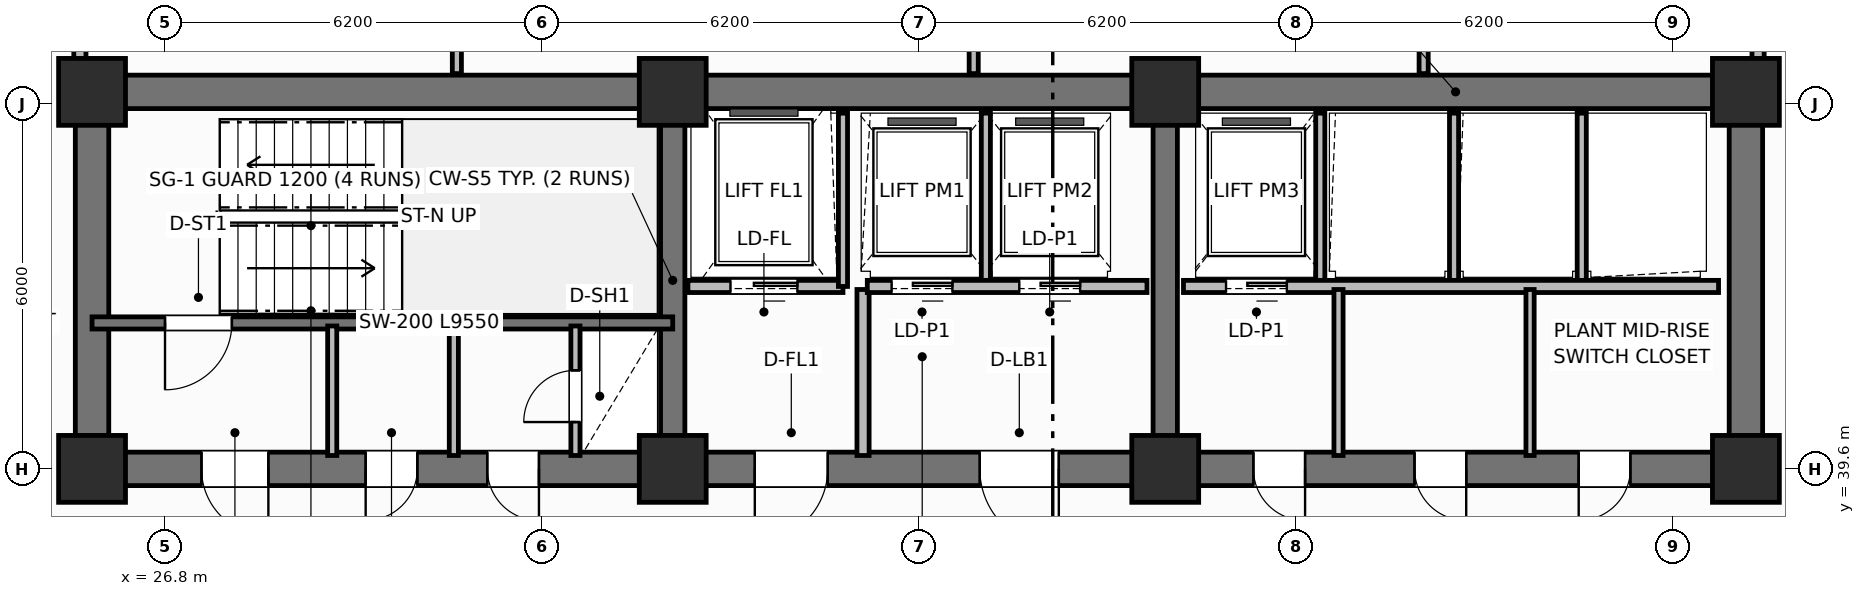
"""IFC4 building model, lengths in metres.
Left out: names, types, materials, properties, quantities, classifications, styles, units other than length and angle.
Written with IfcOpenShell. Run it as: python <this file> out.ifc"""

import sys

from ifc_helpers import new_model, si_unit, direction, frame, frame_2d, origin, origin_2d, place, context, subcontext, project, spatial, rectangle, extrude, element, fill, save


model = new_model("IFC4")
c1 = context("Model", 3, precision=1e-05, world=origin(), true_north=direction((0.0, 1.0)))
c2 = subcontext(c1, "Body", "Model", "MODEL_VIEW")
j1 = project(units=[si_unit("LENGTHUNIT", "METRE"), si_unit("PLANEANGLEUNIT", "RADIAN")], contexts=[c1])
p1 = place(None, origin())
s1 = spatial("IfcSite", under=j1, at=p1, CompositionType="ELEMENT")
p2 = place(p1, origin())
s2 = spatial("IfcBuilding", under=s1, at=p2, CompositionType="ELEMENT")
p3 = place(p2, frame((0.0, 0.0, 132.7)))
s3 = spatial("IfcBuildingStorey", under=s2, at=p3, CompositionType="ELEMENT", Elevation=132.7)
p4 = place(p3, frame((25.6, 45.8, 0.0), z_axis=(0.0, 0.0, 1.0), x_axis=(1.0, 0.0, 0.0)))
e1 = element("IfcWall", 1, at=p4, inside=s3, PredefinedType="SHEAR", context=c2, shape_type="SweptSolid", body=[
    extrude(rectangle(XDim=27.2, YDim=0.55, at=frame_2d((13.6, 0.0))), origin(), (0.0, 0.0, 1.0), 3.7),
])
for number, where, z_axis, x_axis in (
    (2, (25.6, 39.875, 0.0), (0.0, 0.0, 1.0), (0.0, 1.0, 0.0)),
    (3, (52.8, 39.875, 0.0), (0.0, 0.0, 1.0), (0.0, 1.0, 0.0)),
):
    element("IfcWall", number, at=place(p3, frame(where, z_axis=z_axis, x_axis=x_axis)), inside=s3, PredefinedType="SHEAR", context=c2, shape_type="SweptSolid", body=[
        extrude(rectangle(XDim=5.65, YDim=0.55, at=frame_2d((2.825, 0.0))), origin(), (0.0, 0.0, 1.0), 3.7),
    ])
p5 = place(p3, frame((52.8, 39.6, 0.0), z_axis=(0.0, 0.0, 1.0), x_axis=(-1.0, 0.0, 0.0)))
e4 = element("IfcWall", 4, at=p5, inside=s3, PredefinedType="SHEAR", context=c2, shape_type="SweptSolid", body=[
    extrude(rectangle(XDim=27.2, YDim=0.55, at=frame_2d((13.6, 0.0))), origin(), (0.0, 0.0, 1.0), 3.7),
])
p6 = place(p5, frame((24.3, 0.0, 0.0)))
e5 = element("IfcOpeningElement", 5, at=p6, cuts=e4, PredefinedType="OPENING", context=c2, shape_type="SweptSolid", body=[
    extrude(rectangle(XDim=1.1, YDim=2.15, at=frame_2d((0.55, 1.075))), frame((0.0, 0.285, 0.0), z_axis=(0.0, -1.0, 0.0), x_axis=(1.0, 0.0, 0.0)), (0.0, 0.0, 1.0), 0.57),
])
p7 = place(p5, frame((21.85, 0.0, 0.0)))
e6 = element("IfcOpeningElement", 6, at=p7, cuts=e4, PredefinedType="OPENING", context=c2, shape_type="SweptSolid", body=[
    extrude(rectangle(XDim=0.85, YDim=2.1, at=frame_2d((0.425, 1.05))), frame((0.0, 0.285, 0.0), z_axis=(0.0, -1.0, 0.0), x_axis=(1.0, 0.0, 0.0)), (0.0, 0.0, 1.0), 0.57),
])
p8 = place(p5, frame((19.85, 0.0, 0.0)))
e7 = element("IfcOpeningElement", 7, at=p8, cuts=e4, PredefinedType="OPENING", context=c2, shape_type="SweptSolid", body=[
    extrude(rectangle(XDim=0.85, YDim=2.1, at=frame_2d((0.425, 1.05))), frame((0.0, 0.285, 0.0), z_axis=(0.0, -1.0, 0.0), x_axis=(1.0, 0.0, 0.0)), (0.0, 0.0, 1.0), 0.57),
])
p9 = place(p5, frame((15.1, 0.0, 0.0)))
e8 = element("IfcOpeningElement", 8, at=p9, cuts=e4, PredefinedType="OPENING", context=c2, shape_type="SweptSolid", body=[
    extrude(rectangle(XDim=1.2, YDim=2.15, at=frame_2d((0.6, 1.075))), frame((0.0, 0.285, 0.0), z_axis=(0.0, -1.0, 0.0), x_axis=(1.0, 0.0, 0.0)), (0.0, 0.0, 1.0), 0.57),
])
p10 = place(p5, frame((11.3, 0.0, 0.0)))
e9 = element("IfcOpeningElement", 9, at=p10, cuts=e4, PredefinedType="OPENING", context=c2, shape_type="SweptSolid", body=[
    extrude(rectangle(XDim=1.3, YDim=2.2, at=frame_2d((0.65, 1.1))), frame((0.0, 0.285, 0.0), z_axis=(0.0, -1.0, 0.0), x_axis=(1.0, 0.0, 0.0)), (0.0, 0.0, 1.0), 0.57),
])
p11 = place(p5, frame((7.25, 0.0, 0.0)))
e10 = element("IfcOpeningElement", 10, at=p11, cuts=e4, PredefinedType="OPENING", context=c2, shape_type="SweptSolid", body=[
    extrude(rectangle(XDim=0.85, YDim=2.1, at=frame_2d((0.425, 1.05))), frame((0.0, 0.285, 0.0), z_axis=(0.0, -1.0, 0.0), x_axis=(1.0, 0.0, 0.0)), (0.0, 0.0, 1.0), 0.57),
])
p12 = place(p5, frame((4.6, 0.0, 0.0)))
e11 = element("IfcOpeningElement", 11, at=p12, cuts=e4, PredefinedType="OPENING", context=c2, shape_type="SweptSolid", body=[
    extrude(rectangle(XDim=0.85, YDim=2.1, at=frame_2d((0.425, 1.05))), frame((0.0, 0.285, 0.0), z_axis=(0.0, -1.0, 0.0), x_axis=(1.0, 0.0, 0.0)), (0.0, 0.0, 1.0), 0.57),
])
p13 = place(p5, frame((1.9, 0.0, 0.0)))
e12 = element("IfcOpeningElement", 12, at=p13, cuts=e4, PredefinedType="OPENING", context=c2, shape_type="SweptSolid", body=[
    extrude(rectangle(XDim=0.85, YDim=2.1, at=frame_2d((0.425, 1.05))), frame((0.0, 0.285, 0.0), z_axis=(0.0, -1.0, 0.0), x_axis=(1.0, 0.0, 0.0)), (0.0, 0.0, 1.0), 0.57),
])
for number, where, z_axis, x_axis in (
    (13, (35.15, 39.875, 0.0), (0.0, 0.0, 1.0), (0.0, 1.0, 0.0)),
    (14, (43.25, 39.875, 0.0), (0.0, 0.0, 1.0), (0.0, 1.0, 0.0)),
):
    element("IfcWall", number, at=place(p3, frame(where, z_axis=z_axis, x_axis=x_axis)), inside=s3, PredefinedType="SHEAR", context=c2, shape_type="SweptSolid", body=[
        extrude(rectangle(XDim=5.65, YDim=0.4, at=frame_2d((2.825, 0.0))), origin(), (0.0, 0.0, 1.0), 3.7),
    ])
for number, where, z_axis, x_axis in (
    (15, (25.6, 39.6, 0.0), (0.0, 0.0, 1.0), (1.0, 0.0, 0.0)),
    (16, (25.6, 45.8, 0.0), (0.0, 0.0, 1.0), (1.0, 0.0, 0.0)),
    (17, (35.15, 39.6, 0.0), (0.0, 0.0, 1.0), (1.0, 0.0, 0.0)),
    (18, (35.15, 45.8, 0.0), (0.0, 0.0, 1.0), (1.0, 0.0, 0.0)),
    (19, (43.25, 39.6, 0.0), (0.0, 0.0, 1.0), (1.0, 0.0, 0.0)),
    (20, (43.25, 45.8, 0.0), (0.0, 0.0, 1.0), (1.0, 0.0, 0.0)),
    (21, (52.8, 39.6, 0.0), (0.0, 0.0, 1.0), (1.0, 0.0, 0.0)),
    (22, (52.8, 45.8, 0.0), (0.0, 0.0, 1.0), (1.0, 0.0, 0.0)),
):
    element("IfcColumn", number, at=place(p3, frame(where, z_axis=z_axis, x_axis=x_axis)), inside=s3, PredefinedType="COLUMN", context=c2, shape_type="SweptSolid", body=[
        extrude(rectangle(XDim=1.1, YDim=1.1, at=origin_2d()), origin(), (0.0, 0.0, 1.0), 3.7),
    ])
p14 = place(p3, frame((35.15, 42.0, 0.0), z_axis=(0.0, 0.0, 1.0), x_axis=(-1.0, 0.0, 0.0)))
e23 = element("IfcWall", 23, at=p14, inside=s3, PredefinedType="SHEAR", context=c2, shape_type="SweptSolid", body=[
    extrude(rectangle(XDim=9.55, YDim=0.2, at=frame_2d((4.775, 0.0))), origin(), (0.0, 0.0, 1.0), 3.7),
])
p15 = place(p14, frame((7.25, 0.0, 0.0)))
e24 = element("IfcOpeningElement", 24, at=p15, cuts=e23, PredefinedType="OPENING", context=c2, shape_type="SweptSolid", body=[
    extrude(rectangle(XDim=1.1, YDim=2.15, at=frame_2d((0.55, 1.075))), frame((0.0, 0.11, 0.0), z_axis=(0.0, -1.0, 0.0), x_axis=(1.0, 0.0, 0.0)), (0.0, 0.0, 1.0), 0.22),
])
p16 = place(p3, frame((33.55, 39.82, 0.0), z_axis=(0.0, 0.0, 1.0), x_axis=(0.0, 1.0, 0.0)))
e25 = element("IfcWall", 25, at=p16, inside=s3, PredefinedType="PARTITIONING", context=c2, shape_type="SweptSolid", body=[
    extrude(rectangle(XDim=2.13, YDim=0.15, at=frame_2d((1.065, 0.0))), origin(), (0.0, 0.0, 1.0), 2.49),
])
p17 = place(p16, frame((0.55, 0.0, 0.0)))
e26 = element("IfcOpeningElement", 26, at=p17, cuts=e25, PredefinedType="OPENING", context=c2, shape_type="SweptSolid", body=[
    extrude(rectangle(XDim=0.85, YDim=2.05, at=frame_2d((0.425, 1.025))), frame((0.0, 0.085, 0.0), z_axis=(0.0, -1.0, 0.0), x_axis=(1.0, 0.0, 0.0)), (0.0, 0.0, 1.0), 0.17),
])
for number, where, z_axis, x_axis in (
    (27, (29.55, 39.82, 0.0), (0.0, 0.0, 1.0), (0.0, 1.0, 0.0)),
    (28, (31.55, 39.82, 0.0), (0.0, 0.0, 1.0), (0.0, 1.0, 0.0)),
):
    element("IfcWall", number, at=place(p3, frame(where, z_axis=z_axis, x_axis=x_axis)), inside=s3, PredefinedType="PARTITIONING", context=c2, shape_type="SweptSolid", body=[
        extrude(rectangle(XDim=2.13, YDim=0.15, at=frame_2d((1.065, 0.0))), origin(), (0.0, 0.0, 1.0), 2.49),
    ])
p18 = place(p3, frame((37.95, 42.6, 0.0), z_axis=(0.0, 0.0, 1.0), x_axis=(-1.0, 0.0, 0.0)))
e29 = element("IfcWall", 29, at=p18, inside=s3, PredefinedType="PARTITIONING", context=c2, shape_type="SweptSolid", body=[
    extrude(rectangle(XDim=2.55, YDim=0.2, at=frame_2d((1.275, 0.0))), origin(), (0.0, 0.0, 1.0), 2.26),
])
p19 = place(p18, frame((0.75, 0.0, 0.0)))
e30 = element("IfcOpeningElement", 30, at=p19, cuts=e29, PredefinedType="OPENING", context=c2, shape_type="SweptSolid", body=[
    extrude(rectangle(XDim=1.1, YDim=2.15, at=frame_2d((0.55, 1.075))), frame((0.0, 0.11, 0.0), z_axis=(0.0, -1.0, 0.0), x_axis=(1.0, 0.0, 0.0)), (0.0, 0.0, 1.0), 0.22),
])
p20 = place(p3, frame((37.95, 42.6, 0.0), z_axis=(0.0, 0.0, 1.0), x_axis=(0.0, 1.0, 0.0)))
e31 = element("IfcWall", 31, at=p20, inside=s3, PredefinedType="PARTITIONING", context=c2, shape_type="SweptSolid", body=[
    extrude(rectangle(XDim=2.85, YDim=0.15, at=frame_2d((1.425, 0.0))), origin(), (0.0, 0.0, 1.0), 2.49),
])
p21 = place(p3, frame((38.28, 39.82, 0.0), z_axis=(0.0, 0.0, 1.0), x_axis=(0.0, 1.0, 0.0)))
e32 = element("IfcWall", 32, at=p21, inside=s3, PredefinedType="PARTITIONING", context=c2, shape_type="SweptSolid", body=[
    extrude(rectangle(XDim=2.73, YDim=0.2, at=frame_2d((1.365, 0.0))), origin(), (0.0, 0.0, 1.0), 2.49),
])
p22 = place(p3, frame((40.3, 42.65, 0.0), z_axis=(0.0, 0.0, 1.0), x_axis=(0.0, 1.0, 0.0)))
e33 = element("IfcWall", 33, at=p22, inside=s3, PredefinedType="PARTITIONING", context=c2, shape_type="SweptSolid", body=[
    extrude(rectangle(XDim=2.8, YDim=0.15, at=frame_2d((1.4, 0.0))), origin(), (0.0, 0.0, 1.0), 2.49),
])
p23 = place(p3, frame((42.95, 42.6, 0.0), z_axis=(0.0, 0.0, 1.0), x_axis=(-1.0, 0.0, 0.0)))
e34 = element("IfcWall", 34, at=p23, inside=s3, PredefinedType="PARTITIONING", context=c2, shape_type="SweptSolid", body=[
    extrude(rectangle(XDim=4.6, YDim=0.2, at=frame_2d((2.3, 0.0))), origin(), (0.0, 0.0, 1.0), 2.26),
])
p24 = place(p23, frame((3.2, 0.0, 0.0)))
e35 = element("IfcOpeningElement", 35, at=p24, cuts=e34, PredefinedType="OPENING", context=c2, shape_type="SweptSolid", body=[
    extrude(rectangle(XDim=1.0, YDim=2.15, at=frame_2d((0.5, 1.075))), frame((0.0, 0.11, 0.0), z_axis=(0.0, -1.0, 0.0), x_axis=(1.0, 0.0, 0.0)), (0.0, 0.0, 1.0), 0.22),
])
p25 = place(p23, frame((1.1, 0.0, 0.0)))
e36 = element("IfcOpeningElement", 36, at=p25, cuts=e34, PredefinedType="OPENING", context=c2, shape_type="SweptSolid", body=[
    extrude(rectangle(XDim=1.0, YDim=2.15, at=frame_2d((0.5, 1.075))), frame((0.0, 0.11, 0.0), z_axis=(0.0, -1.0, 0.0), x_axis=(1.0, 0.0, 0.0)), (0.0, 0.0, 1.0), 0.22),
])
for number, where, z_axis, x_axis in (
    (37, (45.8, 42.65, 0.0), (0.0, 0.0, 1.0), (0.0, 1.0, 0.0)),
    (38, (48.0, 42.65, 0.0), (0.0, 0.0, 1.0), (0.0, 1.0, 0.0)),
    (39, (50.1, 42.65, 0.0), (0.0, 0.0, 1.0), (0.0, 1.0, 0.0)),
):
    element("IfcWall", number, at=place(p3, frame(where, z_axis=z_axis, x_axis=x_axis)), inside=s3, PredefinedType="PARTITIONING", context=c2, shape_type="SweptSolid", body=[
        extrude(rectangle(XDim=2.8, YDim=0.15, at=frame_2d((1.4, 0.0))), origin(), (0.0, 0.0, 1.0), 2.49),
    ])
p26 = place(p3, frame((52.35, 42.6, 0.0), z_axis=(0.0, 0.0, 1.0), x_axis=(-1.0, 0.0, 0.0)))
e40 = element("IfcWall", 40, at=p26, inside=s3, PredefinedType="PARTITIONING", context=c2, shape_type="SweptSolid", body=[
    extrude(rectangle(XDim=8.8, YDim=0.2, at=frame_2d((4.4, 0.0))), origin(), (0.0, 0.0, 1.0), 2.49),
])
p27 = place(p26, frame((7.1, 0.0, 0.0)))
e41 = element("IfcOpeningElement", 41, at=p27, cuts=e40, PredefinedType="OPENING", context=c2, shape_type="SweptSolid", body=[
    extrude(rectangle(XDim=1.0, YDim=2.15, at=frame_2d((0.5, 1.075))), frame((0.0, 0.11, 0.0), z_axis=(0.0, -1.0, 0.0), x_axis=(1.0, 0.0, 0.0)), (0.0, 0.0, 1.0), 0.22),
])
p28 = place(p3, frame((46.1, 39.82, 0.0), z_axis=(0.0, 0.0, 1.0), x_axis=(0.0, 1.0, 0.0)))
e42 = element("IfcWall", 42, at=p28, inside=s3, PredefinedType="PARTITIONING", context=c2, shape_type="SweptSolid", body=[
    extrude(rectangle(XDim=2.73, YDim=0.15, at=frame_2d((1.365, 0.0))), origin(), (0.0, 0.0, 1.0), 2.49),
])
p29 = place(p3, frame((49.25, 39.82, 0.0), z_axis=(0.0, 0.0, 1.0), x_axis=(0.0, 1.0, 0.0)))
e43 = element("IfcWall", 43, at=p29, inside=s3, PredefinedType="PARTITIONING", context=c2, shape_type="SweptSolid", body=[
    extrude(rectangle(XDim=2.73, YDim=0.135, at=frame_2d((1.365, 0.0))), origin(), (0.0, 0.0, 1.0), 2.49),
])
p30 = place(p3, frame((31.6, 46.1, 0.0), z_axis=(0.0, 0.0, 1.0), x_axis=(0.0, 1.0, 0.0)))
e44 = element("IfcWall", 44, at=p30, inside=s3, PredefinedType="PARTITIONING", context=c2, shape_type="SweptSolid", body=[
    extrude(rectangle(XDim=5.33, YDim=0.15, at=frame_2d((2.665, 0.0))), origin(), (0.0, 0.0, 1.0), 2.49),
])
p31 = place(p30, frame((0.85, 0.0, 0.0)))
e45 = element("IfcOpeningElement", 45, at=p31, cuts=e44, PredefinedType="OPENING", context=c2, shape_type="SweptSolid", body=[
    extrude(rectangle(XDim=0.9, YDim=2.1, at=frame_2d((0.45, 1.05))), frame((0.0, 0.085, 0.0), z_axis=(0.0, -1.0, 0.0), x_axis=(1.0, 0.0, 0.0)), (0.0, 0.0, 1.0), 0.17),
])
p32 = place(p3, frame((40.1, 46.1, 0.0), z_axis=(0.0, 0.0, 1.0), x_axis=(0.0, 1.0, 0.0)))
e46 = element("IfcWall", 46, at=p32, inside=s3, PredefinedType="PARTITIONING", context=c2, shape_type="SweptSolid", body=[
    extrude(rectangle(XDim=5.33, YDim=0.15, at=frame_2d((2.665, 0.0))), origin(), (0.0, 0.0, 1.0), 2.49),
])
p33 = place(p3, frame((47.5, 46.1, 0.0), z_axis=(0.0, 0.0, 1.0), x_axis=(0.0, 1.0, 0.0)))
e47 = element("IfcWall", 47, at=p33, inside=s3, PredefinedType="PARTITIONING", context=c2, shape_type="SweptSolid", body=[
    extrude(rectangle(XDim=5.33, YDim=0.15, at=frame_2d((2.665, 0.0))), origin(), (0.0, 0.0, 1.0), 2.49),
])
p34 = place(p33, frame((0.85, 0.0, 0.0)))
e48 = element("IfcOpeningElement", 48, at=p34, cuts=e47, PredefinedType="OPENING", context=c2, shape_type="SweptSolid", body=[
    extrude(rectangle(XDim=0.9, YDim=2.1, at=frame_2d((0.45, 1.05))), frame((0.0, 0.085, 0.0), z_axis=(0.0, -1.0, 0.0), x_axis=(1.0, 0.0, 0.0)), (0.0, 0.0, 1.0), 0.17),
])
p35 = place(p3, frame((25.4, 46.1, 0.0), z_axis=(0.0, 0.0, 1.0), x_axis=(0.0, 1.0, 0.0)))
e49 = element("IfcWall", 49, at=p35, inside=s3, PredefinedType="PARTITIONING", context=c2, shape_type="SweptSolid", body=[
    extrude(rectangle(XDim=4.13, YDim=0.2, at=frame_2d((2.065, 0.0))), origin(), (0.0, 0.0, 1.0), 2.49),
])
p36 = place(p35, frame((1.05, 0.0, 0.0)))
e50 = element("IfcOpeningElement", 50, at=p36, cuts=e49, PredefinedType="OPENING", context=c2, shape_type="SweptSolid", body=[
    extrude(rectangle(XDim=0.9, YDim=2.1, at=frame_2d((0.45, 1.05))), frame((0.0, 0.11, 0.0), z_axis=(0.0, -1.0, 0.0), x_axis=(1.0, 0.0, 0.0)), (0.0, 0.0, 1.0), 0.22),
])
p37 = place(p3, frame((53.0, 46.1, 0.0), z_axis=(0.0, 0.0, 1.0), x_axis=(0.0, 1.0, 0.0)))
e51 = element("IfcWall", 51, at=p37, inside=s3, PredefinedType="PARTITIONING", context=c2, shape_type="SweptSolid", body=[
    extrude(rectangle(XDim=4.13, YDim=0.2, at=frame_2d((2.065, 0.0))), origin(), (0.0, 0.0, 1.0), 2.49),
])
p38 = place(p37, frame((1.05, 0.0, 0.0)))
e52 = element("IfcOpeningElement", 52, at=p38, cuts=e51, PredefinedType="OPENING", context=c2, shape_type="SweptSolid", body=[
    extrude(rectangle(XDim=0.9, YDim=2.1, at=frame_2d((0.45, 1.05))), frame((0.0, 0.11, 0.0), z_axis=(0.0, -1.0, 0.0), x_axis=(1.0, 0.0, 0.0)), (0.0, 0.0, 1.0), 0.22),
])
p39 = place(p15, origin())
e53 = element("IfcDoor", 53, at=p39, inside=s3, OperationType="SINGLE_SWING_RIGHT", PredefinedType="DOOR", context=c2, shape_type="SweptSolid", body=[
    extrude(rectangle(XDim=1.1, YDim=2.15, at=frame_2d((0.55, 1.075))), frame((0.0, 0.025, 0.0), z_axis=(0.0, -1.0, 0.0), x_axis=(1.0, 0.0, 0.0)), (0.0, 0.0, 1.0), 0.05),
])
fill(e24, e53)
p40 = place(p17, origin())
e54 = element("IfcDoor", 54, at=p40, inside=s3, OperationType="SINGLE_SWING_LEFT", PredefinedType="TRAPDOOR", context=c2, shape_type="SweptSolid", body=[
    extrude(rectangle(XDim=0.85, YDim=2.05, at=frame_2d((0.425, 1.025))), frame((0.0, 0.025, 0.0), z_axis=(0.0, -1.0, 0.0), x_axis=(1.0, 0.0, 0.0)), (0.0, 0.0, 1.0), 0.05),
])
fill(e26, e54)
p41 = place(p19, origin())
e55 = element("IfcDoor", 55, at=p41, inside=s3, OperationType="SLIDING_TO_LEFT", PredefinedType="DOOR", context=c2, shape_type="SweptSolid", body=[
    extrude(rectangle(XDim=1.1, YDim=2.15, at=frame_2d((0.55, 1.075))), frame((0.0, 0.025, 0.0), z_axis=(0.0, -1.0, 0.0), x_axis=(1.0, 0.0, 0.0)), (0.0, 0.0, 1.0), 0.05),
])
fill(e30, e55)
p42 = place(p24, origin())
e56 = element("IfcDoor", 56, at=p42, inside=s3, OperationType="SLIDING_TO_LEFT", PredefinedType="DOOR", context=c2, shape_type="SweptSolid", body=[
    extrude(rectangle(XDim=1.0, YDim=2.15, at=frame_2d((0.5, 1.075))), frame((0.0, 0.025, 0.0), z_axis=(0.0, -1.0, 0.0), x_axis=(1.0, 0.0, 0.0)), (0.0, 0.0, 1.0), 0.05),
])
fill(e35, e56)
p43 = place(p25, origin())
e57 = element("IfcDoor", 57, at=p43, inside=s3, OperationType="SLIDING_TO_LEFT", PredefinedType="DOOR", context=c2, shape_type="SweptSolid", body=[
    extrude(rectangle(XDim=1.0, YDim=2.15, at=frame_2d((0.5, 1.075))), frame((0.0, 0.025, 0.0), z_axis=(0.0, -1.0, 0.0), x_axis=(1.0, 0.0, 0.0)), (0.0, 0.0, 1.0), 0.05),
])
fill(e36, e57)
p44 = place(p27, origin())
e58 = element("IfcDoor", 58, at=p44, inside=s3, OperationType="SLIDING_TO_LEFT", PredefinedType="DOOR", context=c2, shape_type="SweptSolid", body=[
    extrude(rectangle(XDim=1.0, YDim=2.15, at=frame_2d((0.5, 1.075))), frame((0.0, 0.025, 0.0), z_axis=(0.0, -1.0, 0.0), x_axis=(1.0, 0.0, 0.0)), (0.0, 0.0, 1.0), 0.05),
])
fill(e41, e58)
p45 = place(p6, origin())
e59 = element("IfcDoor", 59, at=p45, inside=s3, OperationType="SINGLE_SWING_LEFT", PredefinedType="DOOR", context=c2, shape_type="SweptSolid", body=[
    extrude(rectangle(XDim=1.1, YDim=2.15, at=frame_2d((0.55, 1.075))), frame((0.0, 0.025, 0.0), z_axis=(0.0, -1.0, 0.0), x_axis=(1.0, 0.0, 0.0)), (0.0, 0.0, 1.0), 0.05),
])
fill(e5, e59)
p46 = place(p7, origin())
e60 = element("IfcDoor", 60, at=p46, inside=s3, OperationType="SINGLE_SWING_RIGHT", PredefinedType="DOOR", context=c2, shape_type="SweptSolid", body=[
    extrude(rectangle(XDim=0.85, YDim=2.1, at=frame_2d((0.425, 1.05))), frame((0.0, 0.025, 0.0), z_axis=(0.0, -1.0, 0.0), x_axis=(1.0, 0.0, 0.0)), (0.0, 0.0, 1.0), 0.05),
])
fill(e6, e60)
p47 = place(p8, origin())
e61 = element("IfcDoor", 61, at=p47, inside=s3, OperationType="SINGLE_SWING_LEFT", PredefinedType="DOOR", context=c2, shape_type="SweptSolid", body=[
    extrude(rectangle(XDim=0.85, YDim=2.1, at=frame_2d((0.425, 1.05))), frame((0.0, 0.025, 0.0), z_axis=(0.0, -1.0, 0.0), x_axis=(1.0, 0.0, 0.0)), (0.0, 0.0, 1.0), 0.05),
])
fill(e7, e61)
p48 = place(p9, origin())
e62 = element("IfcDoor", 62, at=p48, inside=s3, OperationType="SINGLE_SWING_RIGHT", PredefinedType="DOOR", context=c2, shape_type="SweptSolid", body=[
    extrude(rectangle(XDim=1.2, YDim=2.15, at=frame_2d((0.6, 1.075))), frame((0.0, 0.025, 0.0), z_axis=(0.0, -1.0, 0.0), x_axis=(1.0, 0.0, 0.0)), (0.0, 0.0, 1.0), 0.05),
])
fill(e8, e62)
p49 = place(p10, origin())
e63 = element("IfcDoor", 63, at=p49, inside=s3, OperationType="SINGLE_SWING_LEFT", PredefinedType="DOOR", context=c2, shape_type="SweptSolid", body=[
    extrude(rectangle(XDim=1.3, YDim=2.2, at=frame_2d((0.65, 1.1))), frame((0.0, 0.025, 0.0), z_axis=(0.0, -1.0, 0.0), x_axis=(1.0, 0.0, 0.0)), (0.0, 0.0, 1.0), 0.05),
])
fill(e9, e63)
p50 = place(p11, origin())
e64 = element("IfcDoor", 64, at=p50, inside=s3, OperationType="SINGLE_SWING_LEFT", PredefinedType="DOOR", context=c2, shape_type="SweptSolid", body=[
    extrude(rectangle(XDim=0.85, YDim=2.1, at=frame_2d((0.425, 1.05))), frame((0.0, 0.025, 0.0), z_axis=(0.0, -1.0, 0.0), x_axis=(1.0, 0.0, 0.0)), (0.0, 0.0, 1.0), 0.05),
])
fill(e10, e64)
p51 = place(p12, origin())
e65 = element("IfcDoor", 65, at=p51, inside=s3, OperationType="SINGLE_SWING_LEFT", PredefinedType="DOOR", context=c2, shape_type="SweptSolid", body=[
    extrude(rectangle(XDim=0.85, YDim=2.1, at=frame_2d((0.425, 1.05))), frame((0.0, 0.025, 0.0), z_axis=(0.0, -1.0, 0.0), x_axis=(1.0, 0.0, 0.0)), (0.0, 0.0, 1.0), 0.05),
])
fill(e11, e65)
p52 = place(p13, origin())
e66 = element("IfcDoor", 66, at=p52, inside=s3, OperationType="SINGLE_SWING_RIGHT", PredefinedType="DOOR", context=c2, shape_type="SweptSolid", body=[
    extrude(rectangle(XDim=0.85, YDim=2.1, at=frame_2d((0.425, 1.05))), frame((0.0, 0.025, 0.0), z_axis=(0.0, -1.0, 0.0), x_axis=(1.0, 0.0, 0.0)), (0.0, 0.0, 1.0), 0.05),
])
fill(e12, e66)
save(model, sys.argv[1])
